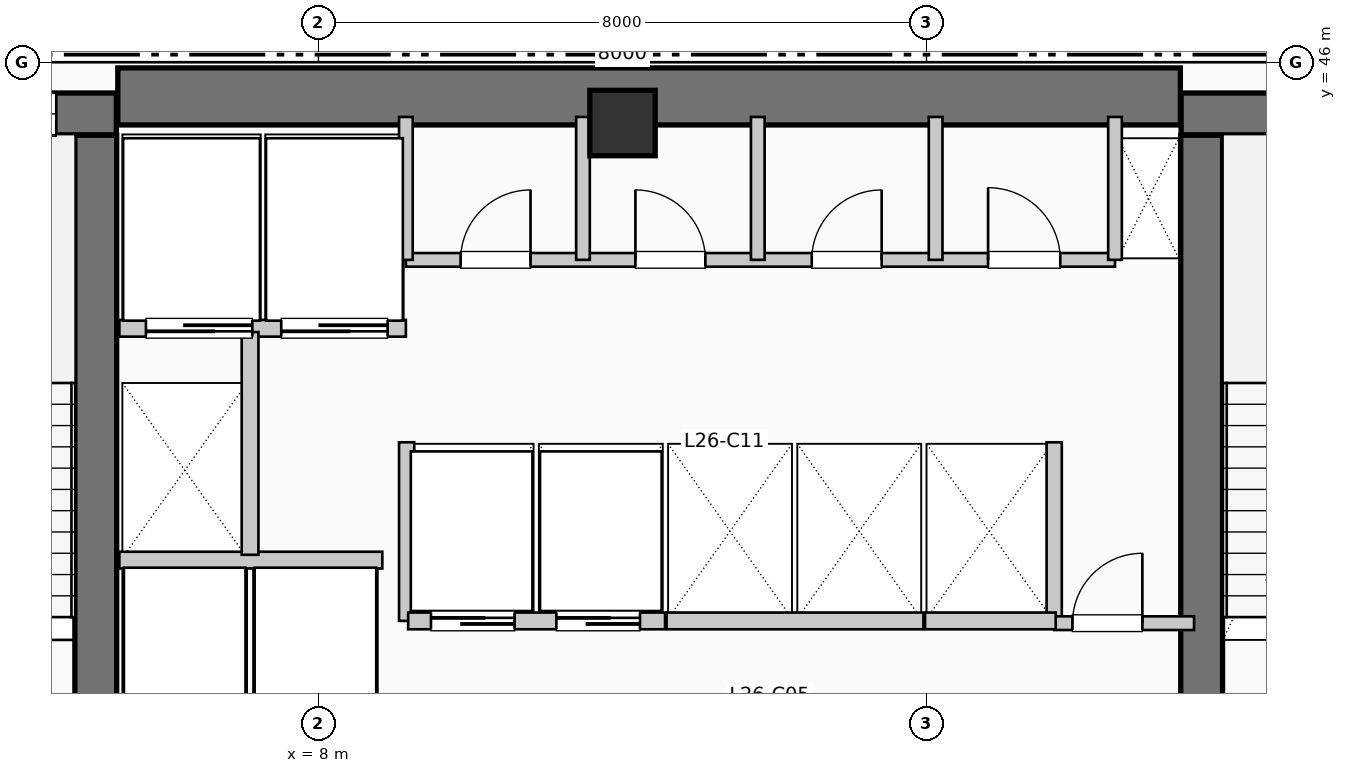
"""IFC4 building model, lengths in metres.
Left out: names, types, materials, properties, quantities, classifications, styles, units other than length and angle.
Written with IfcOpenShell. Run it as: python <this file> out.ifc"""

import sys

from ifc_helpers import new_model, si_unit, direction, frame, frame_2d, origin, origin_2d, place, context, subcontext, project, spatial, rectangle, extrude, element, fill, save


model = new_model("IFC4")
c1 = context("Model", 3, precision=1e-05, world=origin(), true_north=direction((0.0, 1.0)))
c2 = subcontext(c1, "Body", "Model", "MODEL_VIEW")
j1 = project(units=[si_unit("LENGTHUNIT", "METRE"), si_unit("PLANEANGLEUNIT", "RADIAN")], contexts=[c1])
p1 = place(None, origin())
s1 = spatial("IfcSite", under=j1, at=p1, CompositionType="ELEMENT")
p2 = place(p1, origin())
s2 = spatial("IfcBuilding", under=s1, at=p2, CompositionType="ELEMENT")
p3 = place(p2, frame((0.0, 0.0, 110.55)))
s3 = spatial("IfcBuildingStorey", under=s2, at=p3, CompositionType="ELEMENT", Elevation=110.55)
p4 = place(p3, frame((5.36, 45.55, 0.0), z_axis=(0.0, 0.0, 1.0), x_axis=(1.0, 0.0, 0.0)))
e1 = element("IfcWall", 1, at=p4, inside=s3, PredefinedType="SHEAR", context=c2, shape_type="SweptSolid", body=[
    extrude(rectangle(XDim=13.98, YDim=0.75, at=frame_2d((6.99, 0.0))), origin(), (0.0, 0.0, 1.0), 3.96),
])
p5 = place(p3, frame((5.07, 37.15, 0.0), z_axis=(0.0, 0.0, 1.0), x_axis=(0.0, 1.0, 0.0)))
e2 = element("IfcWall", 2, at=p5, inside=s3, PredefinedType="SHEAR", context=c2, shape_type="SweptSolid", body=[
    extrude(rectangle(XDim=7.89, YDim=0.55, at=frame_2d((3.945, 0.0))), origin(), (0.0, 0.0, 1.0), 3.96),
])
p6 = place(p3, frame((1.1, 45.32, 0.0), z_axis=(0.0, 0.0, 1.0), x_axis=(1.0, 0.0, 0.0)))
e3 = element("IfcWall", 3, at=p6, inside=s3, PredefinedType="SHEAR", context=c2, shape_type="SweptSolid", body=[
    extrude(rectangle(XDim=4.24, YDim=0.55, at=frame_2d((2.12, 0.0))), origin(), (0.0, 0.0, 1.0), 3.96),
])
p7 = place(p6, frame((2.05, 0.0, 1.05)))
e4 = element("IfcOpeningElement", 4, at=p7, cuts=e3, PredefinedType="OPENING", context=c2, shape_type="SweptSolid", body=[
    extrude(rectangle(XDim=1.4, YDim=1.8, at=frame_2d((0.7, 0.9))), frame((0.0, 0.285, 0.0), z_axis=(0.0, -1.0, 0.0), x_axis=(1.0, 0.0, 0.0)), (0.0, 0.0, 1.0), 0.57),
])
p8 = place(p3, frame((19.62, 37.15, 0.0), z_axis=(0.0, 0.0, 1.0), x_axis=(0.0, 1.0, 0.0)))
e5 = element("IfcWall", 5, at=p8, inside=s3, PredefinedType="SHEAR", context=c2, shape_type="SweptSolid", body=[
    extrude(rectangle(XDim=7.89, YDim=0.55, at=frame_2d((3.945, 0.0))), origin(), (0.0, 0.0, 1.0), 3.96),
])
p9 = place(p3, frame((19.35, 45.32, 0.0), z_axis=(0.0, 0.0, 1.0), x_axis=(1.0, 0.0, 0.0)))
e6 = element("IfcWall", 6, at=p9, inside=s3, PredefinedType="SHEAR", context=c2, shape_type="SweptSolid", body=[
    extrude(rectangle(XDim=3.69, YDim=0.55, at=frame_2d((1.845, 0.0))), origin(), (0.0, 0.0, 1.0), 3.96),
])
p10 = place(p9, frame((1.15, 0.0, 1.05)))
e7 = element("IfcOpeningElement", 7, at=p10, cuts=e6, PredefinedType="OPENING", context=c2, shape_type="SweptSolid", body=[
    extrude(rectangle(XDim=1.4, YDim=1.8, at=frame_2d((0.7, 0.9))), frame((0.0, 0.285, 0.0), z_axis=(0.0, -1.0, 0.0), x_axis=(1.0, 0.0, 0.0)), (0.0, 0.0, 1.0), 0.57),
])
p11 = place(p3, frame((12.0, 45.2, 0.0), z_axis=(0.0, 0.0, 1.0), x_axis=(1.0, 0.0, 0.0)))
e8 = element("IfcColumn", 8, at=p11, inside=s3, PredefinedType="COLUMN", context=c2, shape_type="SweptSolid", body=[
    extrude(rectangle(XDim=0.86, YDim=0.86, at=origin_2d()), origin(), (0.0, 0.0, 1.0), 3.96),
])
p12 = place(p3, frame((5.38, 39.45, 0.0), z_axis=(0.0, 0.0, 1.0), x_axis=(1.0, 0.0, 0.0)))
e9 = element("IfcWall", 9, at=p12, inside=s3, PredefinedType="PARTITIONING", context=c2, shape_type="SweptSolid", body=[
    extrude(rectangle(XDim=3.46, YDim=0.22, at=frame_2d((1.73, 0.0))), origin(), (0.0, 0.0, 1.0), 3.71),
])
p13 = place(p3, frame((5.38, 42.5, 0.0), z_axis=(0.0, 0.0, 1.0), x_axis=(1.0, 0.0, 0.0)))
e10 = element("IfcWall", 10, at=p13, inside=s3, PredefinedType="PARTITIONING", context=c2, shape_type="SweptSolid", body=[
    extrude(rectangle(XDim=3.77, YDim=0.22, at=frame_2d((1.885, 0.0))), origin(), (0.0, 0.0, 1.0), 3.71),
])
p14 = place(p13, frame((1.75, 0.0, 0.0), z_axis=(0.0, 0.0, 1.0), x_axis=(-1.0, 0.0, 0.0)))
e11 = element("IfcOpeningElement", 11, at=p14, cuts=e10, PredefinedType="OPENING", context=c2, shape_type="SweptSolid", body=[
    extrude(rectangle(XDim=1.4, YDim=2.2, at=frame_2d((0.7, 1.1))), frame((0.0, 0.12, 0.0), z_axis=(0.0, -1.0, 0.0), x_axis=(1.0, 0.0, 0.0)), (0.0, 0.0, 1.0), 0.24),
])
p15 = place(p13, frame((3.53, 0.0, 0.0), z_axis=(0.0, 0.0, 1.0), x_axis=(-1.0, 0.0, 0.0)))
e12 = element("IfcOpeningElement", 12, at=p15, cuts=e10, PredefinedType="OPENING", context=c2, shape_type="SweptSolid", body=[
    extrude(rectangle(XDim=1.4, YDim=2.2, at=frame_2d((0.7, 1.1))), frame((0.0, 0.12, 0.0), z_axis=(0.0, -1.0, 0.0), x_axis=(1.0, 0.0, 0.0)), (0.0, 0.0, 1.0), 0.24),
])
p16 = place(p3, frame((7.1, 39.52, 0.0), z_axis=(0.0, 0.0, 1.0), x_axis=(0.0, 1.0, 0.0)))
e13 = element("IfcWall", 13, at=p16, inside=s3, PredefinedType="PARTITIONING", context=c2, shape_type="SweptSolid", body=[
    extrude(rectangle(XDim=2.93, YDim=0.22, at=frame_2d((1.465, 0.0))), origin(), (0.0, 0.0, 1.0), 3.71),
])
for number, where, z_axis, x_axis in (
    (14, (9.16, 38.65, 0.0), (0.0, 0.0, 1.0), (0.0, 1.0, 0.0)),
    (15, (17.68, 38.65, 0.0), (0.0, 0.0, 1.0), (0.0, 1.0, 0.0)),
):
    element("IfcWall", number, at=place(p3, frame(where, z_axis=z_axis, x_axis=x_axis)), inside=s3, PredefinedType="PARTITIONING", context=c2, shape_type="SweptSolid", body=[
        extrude(rectangle(XDim=2.35, YDim=0.2, at=frame_2d((1.175, 0.0))), origin(), (0.0, 0.0, 1.0), 3.71),
    ])
p17 = place(p3, frame((17.68, 38.62, 0.0), z_axis=(0.0, 0.0, 1.0), x_axis=(1.0, 0.0, 0.0)))
e16 = element("IfcWall", 16, at=p17, inside=s3, PredefinedType="PARTITIONING", context=c2, shape_type="SweptSolid", body=[
    extrude(rectangle(XDim=1.84, YDim=0.18, at=frame_2d((0.92, 0.0))), origin(), (0.0, 0.0, 1.0), 3.71),
])
p18 = place(p17, frame((0.24, 0.0, 0.0)))
e17 = element("IfcOpeningElement", 17, at=p18, cuts=e16, PredefinedType="OPENING", context=c2, shape_type="SweptSolid", body=[
    extrude(rectangle(XDim=0.92, YDim=2.1, at=frame_2d((0.46, 1.05))), frame((0.0, 0.1, 0.0), z_axis=(0.0, -1.0, 0.0), x_axis=(1.0, 0.0, 0.0)), (0.0, 0.0, 1.0), 0.2),
])
p19 = place(p3, frame((9.18, 38.65, 0.0), z_axis=(0.0, 0.0, 1.0), x_axis=(1.0, 0.0, 0.0)))
e18 = element("IfcWall", 18, at=p19, inside=s3, PredefinedType="PARTITIONING", context=c2, shape_type="SweptSolid", body=[
    extrude(rectangle(XDim=3.38, YDim=0.22, at=frame_2d((1.69, 0.0))), origin(), (0.0, 0.0, 1.0), 3.71),
])
p20 = place(p19, frame((0.3, 0.0, 0.0)))
e19 = element("IfcOpeningElement", 19, at=p20, cuts=e18, PredefinedType="OPENING", context=c2, shape_type="SweptSolid", body=[
    extrude(rectangle(XDim=1.1, YDim=2.2, at=frame_2d((0.55, 1.1))), frame((0.0, 0.12, 0.0), z_axis=(0.0, -1.0, 0.0), x_axis=(1.0, 0.0, 0.0)), (0.0, 0.0, 1.0), 0.24),
])
p21 = place(p19, frame((1.95, 0.0, 0.0)))
e20 = element("IfcOpeningElement", 20, at=p21, cuts=e18, PredefinedType="OPENING", context=c2, shape_type="SweptSolid", body=[
    extrude(rectangle(XDim=1.1, YDim=2.2, at=frame_2d((0.55, 1.1))), frame((0.0, 0.12, 0.0), z_axis=(0.0, -1.0, 0.0), x_axis=(1.0, 0.0, 0.0)), (0.0, 0.0, 1.0), 0.24),
])
p22 = place(p3, frame((12.58, 38.65, 0.0), z_axis=(0.0, 0.0, 1.0), x_axis=(1.0, 0.0, 0.0)))
e21 = element("IfcWall", 21, at=p22, inside=s3, PredefinedType="PARTITIONING", context=c2, shape_type="SweptSolid", body=[
    extrude(rectangle(XDim=3.38, YDim=0.22, at=frame_2d((1.69, 0.0))), origin(), (0.0, 0.0, 1.0), 3.71),
])
p23 = place(p3, frame((15.98, 38.65, 0.0), z_axis=(0.0, 0.0, 1.0), x_axis=(1.0, 0.0, 0.0)))
e22 = element("IfcWall", 22, at=p23, inside=s3, PredefinedType="PARTITIONING", context=c2, shape_type="SweptSolid", body=[
    extrude(rectangle(XDim=1.72, YDim=0.22, at=frame_2d((0.86, 0.0))), origin(), (0.0, 0.0, 1.0), 3.71),
])
p24 = place(p3, frame((9.15, 43.4, 0.0), z_axis=(0.0, 0.0, 1.0), x_axis=(1.0, 0.0, 0.0)))
e23 = element("IfcWall", 23, at=p24, inside=s3, PredefinedType="PLUMBINGWALL", context=c2, shape_type="SweptSolid", body=[
    extrude(rectangle(XDim=9.33, YDim=0.18, at=frame_2d((4.665, 0.0))), origin(), (0.0, 0.0, 1.0), 3.71),
])
p25 = place(p24, frame((0.72, 0.0, 0.0)))
e24 = element("IfcOpeningElement", 24, at=p25, cuts=e23, PredefinedType="OPENING", context=c2, shape_type="SweptSolid", body=[
    extrude(rectangle(XDim=0.92, YDim=2.1, at=frame_2d((0.46, 1.05))), frame((0.0, 0.1, 0.0), z_axis=(0.0, -1.0, 0.0), x_axis=(1.0, 0.0, 0.0)), (0.0, 0.0, 1.0), 0.2),
])
p26 = place(p24, frame((3.02, 0.0, 0.0)))
e25 = element("IfcOpeningElement", 25, at=p26, cuts=e23, PredefinedType="OPENING", context=c2, shape_type="SweptSolid", body=[
    extrude(rectangle(XDim=0.92, YDim=2.1, at=frame_2d((0.46, 1.05))), frame((0.0, 0.1, 0.0), z_axis=(0.0, -1.0, 0.0), x_axis=(1.0, 0.0, 0.0)), (0.0, 0.0, 1.0), 0.2),
])
p27 = place(p24, frame((5.34, 0.0, 0.0)))
e26 = element("IfcOpeningElement", 26, at=p27, cuts=e23, PredefinedType="OPENING", context=c2, shape_type="SweptSolid", body=[
    extrude(rectangle(XDim=0.92, YDim=2.1, at=frame_2d((0.46, 1.05))), frame((0.0, 0.1, 0.0), z_axis=(0.0, -1.0, 0.0), x_axis=(1.0, 0.0, 0.0)), (0.0, 0.0, 1.0), 0.2),
])
p28 = place(p24, frame((7.66, 0.0, 0.0)))
e27 = element("IfcOpeningElement", 27, at=p28, cuts=e23, PredefinedType="OPENING", context=c2, shape_type="SweptSolid", body=[
    extrude(rectangle(XDim=0.95, YDim=2.1, at=frame_2d((0.475, 1.05))), frame((0.0, 0.1, 0.0), z_axis=(0.0, -1.0, 0.0), x_axis=(1.0, 0.0, 0.0)), (0.0, 0.0, 1.0), 0.2),
])
for number, where, z_axis, x_axis in (
    (28, (9.15, 43.4, 0.0), (0.0, 0.0, 1.0), (0.0, 1.0, 0.0)),
    (29, (18.48, 43.4, 0.0), (0.0, 0.0, 1.0), (0.0, 1.0, 0.0)),
    (30, (11.48, 43.4, 0.0), (0.0, 0.0, 1.0), (0.0, 1.0, 0.0)),
    (31, (13.78, 43.4, 0.0), (0.0, 0.0, 1.0), (0.0, 1.0, 0.0)),
    (32, (16.12, 43.4, 0.0), (0.0, 0.0, 1.0), (0.0, 1.0, 0.0)),
):
    element("IfcWall", number, at=place(p3, frame(where, z_axis=z_axis, x_axis=x_axis)), inside=s3, PredefinedType="PLUMBINGWALL", context=c2, shape_type="SweptSolid", body=[
        extrude(rectangle(XDim=1.88, YDim=0.18, at=frame_2d((0.94, 0.0))), origin(), (0.0, 0.0, 1.0), 3.71),
    ])
p29 = place(p7, origin())
e33 = element("IfcWindow", 33, at=p29, inside=s3, PartitioningType="SINGLE_PANEL", PredefinedType="WINDOW", context=c2, shape_type="SweptSolid", body=[
    extrude(rectangle(XDim=1.4, YDim=1.8, at=frame_2d((0.7, 0.9))), frame((0.0, 0.03, 0.0), z_axis=(0.0, -1.0, 0.0), x_axis=(1.0, 0.0, 0.0)), (0.0, 0.0, 1.0), 0.06),
])
fill(e4, e33)
p30 = place(p14, origin())
e34 = element("IfcDoor", 34, at=p30, inside=s3, OperationType="SLIDING_TO_LEFT", PredefinedType="DOOR", context=c2, shape_type="SweptSolid", body=[
    extrude(rectangle(XDim=1.4, YDim=2.2, at=frame_2d((0.7, 1.1))), frame((0.0, 0.025, 0.0), z_axis=(0.0, -1.0, 0.0), x_axis=(1.0, 0.0, 0.0)), (0.0, 0.0, 1.0), 0.05),
])
fill(e11, e34)
p31 = place(p15, origin())
e35 = element("IfcDoor", 35, at=p31, inside=s3, OperationType="SLIDING_TO_LEFT", PredefinedType="DOOR", context=c2, shape_type="SweptSolid", body=[
    extrude(rectangle(XDim=1.4, YDim=2.2, at=frame_2d((0.7, 1.1))), frame((0.0, 0.025, 0.0), z_axis=(0.0, -1.0, 0.0), x_axis=(1.0, 0.0, 0.0)), (0.0, 0.0, 1.0), 0.05),
])
fill(e12, e35)
p32 = place(p18, origin())
e36 = element("IfcDoor", 36, at=p32, inside=s3, OperationType="SINGLE_SWING_RIGHT", PredefinedType="DOOR", context=c2, shape_type="SweptSolid", body=[
    extrude(rectangle(XDim=0.92, YDim=2.1, at=frame_2d((0.46, 1.05))), frame((0.0, 0.025, 0.0), z_axis=(0.0, -1.0, 0.0), x_axis=(1.0, 0.0, 0.0)), (0.0, 0.0, 1.0), 0.05),
])
fill(e17, e36)
p33 = place(p20, origin())
e37 = element("IfcDoor", 37, at=p33, inside=s3, OperationType="SLIDING_TO_LEFT", PredefinedType="DOOR", context=c2, shape_type="SweptSolid", body=[
    extrude(rectangle(XDim=1.1, YDim=2.2, at=frame_2d((0.55, 1.1))), frame((0.0, 0.025, 0.0), z_axis=(0.0, -1.0, 0.0), x_axis=(1.0, 0.0, 0.0)), (0.0, 0.0, 1.0), 0.05),
])
fill(e19, e37)
p34 = place(p21, origin())
e38 = element("IfcDoor", 38, at=p34, inside=s3, OperationType="SLIDING_TO_LEFT", PredefinedType="DOOR", context=c2, shape_type="SweptSolid", body=[
    extrude(rectangle(XDim=1.1, YDim=2.2, at=frame_2d((0.55, 1.1))), frame((0.0, 0.025, 0.0), z_axis=(0.0, -1.0, 0.0), x_axis=(1.0, 0.0, 0.0)), (0.0, 0.0, 1.0), 0.05),
])
fill(e20, e38)
p35 = place(p25, origin())
e39 = element("IfcDoor", 39, at=p35, inside=s3, OperationType="SINGLE_SWING_RIGHT", PredefinedType="DOOR", context=c2, shape_type="SweptSolid", body=[
    extrude(rectangle(XDim=0.92, YDim=2.1, at=frame_2d((0.46, 1.05))), frame((0.0, 0.025, 0.0), z_axis=(0.0, -1.0, 0.0), x_axis=(1.0, 0.0, 0.0)), (0.0, 0.0, 1.0), 0.05),
])
fill(e24, e39)
p36 = place(p26, origin())
e40 = element("IfcDoor", 40, at=p36, inside=s3, OperationType="SINGLE_SWING_LEFT", PredefinedType="DOOR", context=c2, shape_type="SweptSolid", body=[
    extrude(rectangle(XDim=0.92, YDim=2.1, at=frame_2d((0.46, 1.05))), frame((0.0, 0.025, 0.0), z_axis=(0.0, -1.0, 0.0), x_axis=(1.0, 0.0, 0.0)), (0.0, 0.0, 1.0), 0.05),
])
fill(e25, e40)
p37 = place(p27, origin())
e41 = element("IfcDoor", 41, at=p37, inside=s3, OperationType="SINGLE_SWING_RIGHT", PredefinedType="DOOR", context=c2, shape_type="SweptSolid", body=[
    extrude(rectangle(XDim=0.92, YDim=2.1, at=frame_2d((0.46, 1.05))), frame((0.0, 0.025, 0.0), z_axis=(0.0, -1.0, 0.0), x_axis=(1.0, 0.0, 0.0)), (0.0, 0.0, 1.0), 0.05),
])
fill(e26, e41)
p38 = place(p28, origin())
e42 = element("IfcDoor", 42, at=p38, inside=s3, OperationType="SINGLE_SWING_LEFT", PredefinedType="DOOR", context=c2, shape_type="SweptSolid", body=[
    extrude(rectangle(XDim=0.95, YDim=2.1, at=frame_2d((0.475, 1.05))), frame((0.0, 0.025, 0.0), z_axis=(0.0, -1.0, 0.0), x_axis=(1.0, 0.0, 0.0)), (0.0, 0.0, 1.0), 0.05),
])
fill(e27, e42)
save(model, sys.argv[1])
